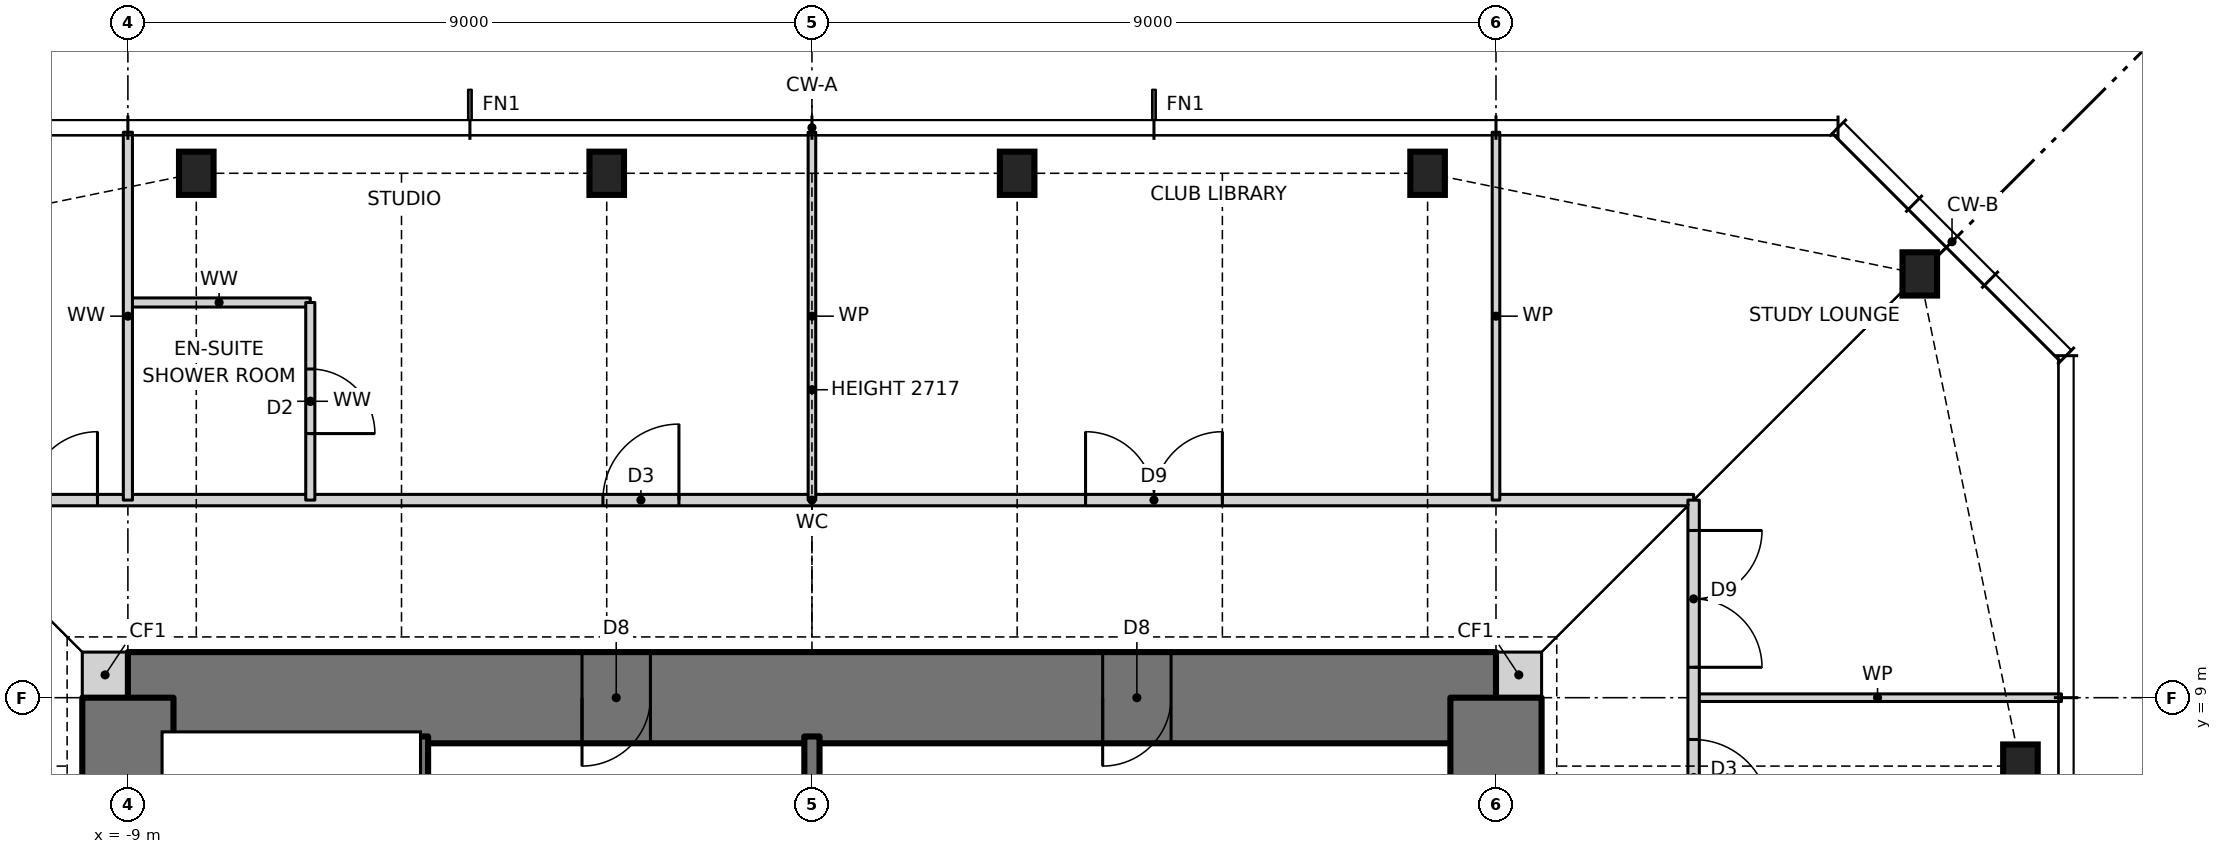
"""IFC4 building model, lengths in metres.
Left out: names, types, materials, properties, quantities, classifications, styles, units other than length and angle.
Written with IfcOpenShell. Run it as: python <this file> out.ifc"""

import sys

from ifc_helpers import new_model, si_unit, direction, frame, frame_2d, origin, origin_2d, place, context, subcontext, project, spatial, rectangle, i_section, extrude, element, fill, save


model = new_model("IFC4")
c1 = context("Model", 3, precision=1e-05, world=origin(), true_north=direction((0.0, 1.0)))
c2 = subcontext(c1, "Body", "Model", "MODEL_VIEW")
j1 = project(units=[si_unit("LENGTHUNIT", "METRE"), si_unit("PLANEANGLEUNIT", "RADIAN")], contexts=[c1])
p1 = place(None, origin())
s1 = spatial("IfcSite", under=j1, at=p1, CompositionType="ELEMENT")
p2 = place(p1, origin())
s2 = spatial("IfcBuilding", under=s1, at=p2, CompositionType="ELEMENT")
p3 = place(p2, frame((0.0, 0.0, 264.0)))
s3 = spatial("IfcBuildingStorey", under=s2, at=p3, CompositionType="ELEMENT", Elevation=264.0)
for number, where, z_axis, x_axis in (
    (1, (15.9, 8.1, 0.0), (0.0, 0.0, 1.0), (1.0, 0.0, 0.0)),
    (2, (14.576, 14.576, 0.0), (0.0, 0.0, 1.0), (1.0, 0.0, 0.0)),
    (3, (8.1, 15.9, 0.0), (0.0, 0.0, 1.0), (1.0, 0.0, 0.0)),
    (4, (2.7, 15.9, 0.0), (0.0, 0.0, 1.0), (1.0, 0.0, 0.0)),
    (5, (-2.7, 15.9, 0.0), (0.0, 0.0, 1.0), (1.0, 0.0, 0.0)),
    (6, (-8.1, 15.9, 0.0), (0.0, 0.0, 1.0), (1.0, 0.0, 0.0)),
):
    element("IfcColumn", number, at=place(p3, frame(where, z_axis=z_axis, x_axis=x_axis)), inside=s3, PredefinedType="COLUMN", context=c2, shape_type="SweptSolid", body=[
        extrude(i_section(OverallWidth=0.455, OverallDepth=0.569, WebThickness=0.078, FlangeThickness=0.125, at=origin_2d()), origin(), (0.0, 0.0, 1.0), 3.5),
    ])
for number, where, z_axis, x_axis in (
    (7, (9.0, 9.3, 0.0), (0.0, 0.0, 1.0), (1.0, 0.0, 0.0)),
    (8, (-9.6, 9.3, 0.0), (0.0, 0.0, 1.0), (1.0, 0.0, 0.0)),
):
    element("IfcWall", number, at=place(p3, frame(where, z_axis=z_axis, x_axis=x_axis)), inside=s3, PredefinedType="SOLIDWALL", context=c2, shape_type="SweptSolid", body=[
        extrude(rectangle(XDim=0.6, YDim=0.6, at=frame_2d((0.3, 0.0))), origin(), (0.0, 0.0, 1.0), 3.5),
    ])
p4 = place(p3, frame((9.0, 9.0, 0.0), z_axis=(0.0, 0.0, 1.0), x_axis=(-1.0, 0.0, 0.0)))
e9 = element("IfcWall", 9, at=p4, inside=s3, PredefinedType="SHEAR", context=c2, shape_type="SweptSolid", body=[
    extrude(rectangle(XDim=18.0, YDim=1.2, at=frame_2d((9.0, 0.0))), origin(), (0.0, 0.0, 1.0), 3.5),
])
p5 = place(p4, frame((11.125, 0.0, 0.0)))
e10 = element("IfcOpeningElement", 10, at=p5, cuts=e9, PredefinedType="OPENING", context=c2, shape_type="SweptSolid", body=[
    extrude(rectangle(XDim=0.9, YDim=2.1, at=frame_2d((0.45, 1.05))), frame((0.0, 0.61, 0.0), z_axis=(0.0, -1.0, 0.0), x_axis=(1.0, 0.0, 0.0)), (0.0, 0.0, 1.0), 1.22),
])
p6 = place(p4, frame((4.275, 0.0, 0.0)))
e11 = element("IfcOpeningElement", 11, at=p6, cuts=e9, PredefinedType="OPENING", context=c2, shape_type="SweptSolid", body=[
    extrude(rectangle(XDim=0.9, YDim=2.1, at=frame_2d((0.45, 1.05))), frame((0.0, 0.61, 0.0), z_axis=(0.0, -1.0, 0.0), x_axis=(1.0, 0.0, 0.0)), (0.0, 0.0, 1.0), 1.22),
])
p7 = place(p3, frame((9.0, -9.0, 0.0), z_axis=(0.0, 0.0, 1.0), x_axis=(0.0, 1.0, 0.0)))
e12 = element("IfcWall", 12, at=p7, inside=s3, PredefinedType="SHEAR", context=c2, shape_type="SweptSolid", body=[
    extrude(rectangle(XDim=18.0, YDim=1.2, at=frame_2d((9.0, 0.0))), origin(), (0.0, 0.0, 1.0), 3.5),
])
p8 = place(p7, frame((8.5, 0.0, 0.0)))
e13 = element("IfcOpeningElement", 13, at=p8, cuts=e12, PredefinedType="OPENING", context=c2, shape_type="SweptSolid", body=[
    extrude(rectangle(XDim=1.0, YDim=2.1, at=frame_2d((0.5, 1.05))), frame((0.0, 0.61, 0.0), z_axis=(0.0, -1.0, 0.0), x_axis=(1.0, 0.0, 0.0)), (0.0, 0.0, 1.0), 1.22),
])
p9 = place(p3, frame((-9.0, 9.0, 0.0), z_axis=(0.0, 0.0, 1.0), x_axis=(0.0, -1.0, 0.0)))
e14 = element("IfcWall", 14, at=p9, inside=s3, PredefinedType="SHEAR", context=c2, shape_type="SweptSolid", body=[
    extrude(rectangle(XDim=18.0, YDim=1.2, at=frame_2d((9.0, 0.0))), origin(), (0.0, 0.0, 1.0), 3.5),
])
p10 = place(p9, frame((8.5, 0.0, 0.0)))
e15 = element("IfcOpeningElement", 15, at=p10, cuts=e14, PredefinedType="OPENING", context=c2, shape_type="SweptSolid", body=[
    extrude(rectangle(XDim=1.0, YDim=2.1, at=frame_2d((0.5, 1.05))), frame((0.0, 0.61, 0.0), z_axis=(0.0, -1.0, 0.0), x_axis=(1.0, 0.0, 0.0)), (0.0, 0.0, 1.0), 1.22),
])
p11 = place(p3, frame((11.6, 9.0, 0.0), z_axis=(0.0, 0.0, 1.0), x_axis=(1.0, 0.0, 0.0)))
e16 = element("IfcWall", 16, at=p11, inside=s3, PredefinedType="PARTITIONING", context=c2, shape_type="SweptSolid", body=[
    extrude(rectangle(XDim=4.84, YDim=0.1, at=frame_2d((2.42, 0.0))), origin(), (0.0, 0.0, 1.0), 3.25),
])
p12 = place(p3, frame((-11.6, 11.6, 0.0), z_axis=(0.0, 0.0, 1.0), x_axis=(1.0, 0.0, 0.0)))
e17 = element("IfcWall", 17, at=p12, inside=s3, PredefinedType="PARTITIONING", context=c2, shape_type="SweptSolid", body=[
    extrude(rectangle(XDim=23.2, YDim=0.15, at=frame_2d((11.6, 0.0))), origin(), (0.0, 0.0, 1.0), 3.25),
])
p13 = place(p12, frame((15.2, 0.0, 0.0)))
e18 = element("IfcOpeningElement", 18, at=p13, cuts=e17, PredefinedType="OPENING", context=c2, shape_type="SweptSolid", body=[
    extrude(rectangle(XDim=1.8, YDim=2.1, at=frame_2d((0.9, 1.05))), frame((0.0, 0.085, 0.0), z_axis=(0.0, -1.0, 0.0), x_axis=(1.0, 0.0, 0.0)), (0.0, 0.0, 1.0), 0.17),
])
p14 = place(p12, frame((8.85, 0.0, 0.0)))
e19 = element("IfcOpeningElement", 19, at=p14, cuts=e17, PredefinedType="OPENING", context=c2, shape_type="SweptSolid", body=[
    extrude(rectangle(XDim=1.0, YDim=2.1, at=frame_2d((0.5, 1.05))), frame((0.0, 0.085, 0.0), z_axis=(0.0, -1.0, 0.0), x_axis=(1.0, 0.0, 0.0)), (0.0, 0.0, 1.0), 0.17),
])
p15 = place(p12, frame((0.4, 0.0, 0.0)))
e20 = element("IfcOpeningElement", 20, at=p15, cuts=e17, PredefinedType="OPENING", context=c2, shape_type="SweptSolid", body=[
    extrude(rectangle(XDim=1.8, YDim=2.1, at=frame_2d((0.9, 1.05))), frame((0.0, 0.085, 0.0), z_axis=(0.0, -1.0, 0.0), x_axis=(1.0, 0.0, 0.0)), (0.0, 0.0, 1.0), 0.17),
])
p16 = place(p3, frame((-9.0, 14.2, 0.0), z_axis=(0.0, 0.0, 1.0), x_axis=(1.0, 0.0, 0.0)))
e21 = element("IfcWall", 21, at=p16, inside=s3, PredefinedType="PARTITIONING", context=c2, shape_type="SweptSolid", body=[
    extrude(rectangle(XDim=2.4, YDim=0.12, at=frame_2d((1.2, 0.0))), origin(), (0.0, 0.0, 1.0), 3.25),
])
p17 = place(p3, frame((11.6, -12.1, 0.0), z_axis=(0.0, 0.0, 1.0), x_axis=(0.0, 1.0, 0.0)))
e22 = element("IfcWall", 22, at=p17, inside=s3, PredefinedType="PARTITIONING", context=c2, shape_type="SweptSolid", body=[
    extrude(rectangle(XDim=23.7, YDim=0.15, at=frame_2d((11.85, 0.0))), origin(), (0.0, 0.0, 1.0), 3.25),
])
p18 = place(p17, frame((6.2, 0.0, 0.0)))
e23 = element("IfcOpeningElement", 23, at=p18, cuts=e22, PredefinedType="OPENING", context=c2, shape_type="SweptSolid", body=[
    extrude(rectangle(XDim=1.0, YDim=2.1, at=frame_2d((0.5, 1.05))), frame((0.0, 0.085, 0.0), z_axis=(0.0, -1.0, 0.0), x_axis=(1.0, 0.0, 0.0)), (0.0, 0.0, 1.0), 0.17),
])
p19 = place(p17, frame((12.65, 0.0, 0.0)))
e24 = element("IfcOpeningElement", 24, at=p19, cuts=e22, PredefinedType="OPENING", context=c2, shape_type="SweptSolid", body=[
    extrude(rectangle(XDim=1.0, YDim=2.1, at=frame_2d((0.5, 1.05))), frame((0.0, 0.085, 0.0), z_axis=(0.0, -1.0, 0.0), x_axis=(1.0, 0.0, 0.0)), (0.0, 0.0, 1.0), 0.17),
])
p20 = place(p17, frame((19.55, 0.0, 0.0)))
e25 = element("IfcOpeningElement", 25, at=p20, cuts=e22, PredefinedType="OPENING", context=c2, shape_type="SweptSolid", body=[
    extrude(rectangle(XDim=1.0, YDim=2.1, at=frame_2d((0.5, 1.05))), frame((0.0, 0.085, 0.0), z_axis=(0.0, -1.0, 0.0), x_axis=(1.0, 0.0, 0.0)), (0.0, 0.0, 1.0), 0.17),
])
p21 = place(p17, frame((21.5, 0.0, 0.0)))
e26 = element("IfcOpeningElement", 26, at=p21, cuts=e22, PredefinedType="OPENING", context=c2, shape_type="SweptSolid", body=[
    extrude(rectangle(XDim=1.8, YDim=2.1, at=frame_2d((0.9, 1.05))), frame((0.0, 0.085, 0.0), z_axis=(0.0, -1.0, 0.0), x_axis=(1.0, 0.0, 0.0)), (0.0, 0.0, 1.0), 0.17),
])
p22 = place(p17, frame((1.125, 0.0, 0.0)))
e27 = element("IfcOpeningElement", 27, at=p22, cuts=e22, PredefinedType="OPENING", context=c2, shape_type="SweptSolid", body=[
    extrude(rectangle(XDim=0.85, YDim=2.1, at=frame_2d((0.425, 1.05))), frame((0.0, 0.085, 0.0), z_axis=(0.0, -1.0, 0.0), x_axis=(1.0, 0.0, 0.0)), (0.0, 0.0, 1.0), 0.17),
])
p23 = place(p3, frame((9.0, 11.6, 0.0), z_axis=(0.0, 0.0, 1.0), x_axis=(0.0, 1.0, 0.0)))
e28 = element("IfcWall", 28, at=p23, inside=s3, PredefinedType="PARTITIONING", context=c2, shape_type="SweptSolid", body=[
    extrude(rectangle(XDim=4.84, YDim=0.1, at=frame_2d((2.42, 0.0))), origin(), (0.0, 0.0, 1.0), 3.25),
])
p24 = place(p3, frame((0.0, 4.4, 0.0), z_axis=(0.0, 0.0, 1.0), x_axis=(0.0, 1.0, 0.0)))
e29 = element("IfcWall", 29, at=p24, inside=s3, PredefinedType="SOLIDWALL", context=c2, shape_type="SweptSolid", body=[
    extrude(rectangle(XDim=4.09, YDim=0.2, at=frame_2d((2.045, 0.0))), origin(), (0.0, 0.0, 1.0), 3.5),
])
p25 = place(p3, frame((0.0, 11.6, 0.0), z_axis=(0.0, 0.0, 1.0), x_axis=(0.0, 1.0, 0.0)))
e30 = element("IfcWall", 30, at=p25, inside=s3, PredefinedType="PARTITIONING", context=c2, shape_type="SweptSolid", body=[
    extrude(rectangle(XDim=4.84, YDim=0.1, at=frame_2d((2.42, 0.0))), origin(), (0.0, 0.0, 1.0), 2.717),
])
p26 = place(p3, frame((-5.15, 1.6, 0.0), z_axis=(0.0, 0.0, 1.0), x_axis=(0.0, 1.0, 0.0)))
e31 = element("IfcWall", 31, at=p26, inside=s3, PredefinedType="SOLIDWALL", context=c2, shape_type="SweptSolid", body=[
    extrude(rectangle(XDim=6.89, YDim=0.2, at=frame_2d((3.445, 0.0))), origin(), (0.0, 0.0, 1.0), 3.5),
])
p27 = place(p3, frame((-6.6, 11.6, 0.0), z_axis=(0.0, 0.0, 1.0), x_axis=(0.0, 1.0, 0.0)))
e32 = element("IfcWall", 32, at=p27, inside=s3, PredefinedType="PARTITIONING", context=c2, shape_type="SweptSolid", body=[
    extrude(rectangle(XDim=2.6, YDim=0.12, at=frame_2d((1.3, 0.0))), origin(), (0.0, 0.0, 1.0), 3.25),
])
p28 = place(p27, frame((0.875, 0.0, 0.0)))
e33 = element("IfcOpeningElement", 33, at=p28, cuts=e32, PredefinedType="OPENING", context=c2, shape_type="SweptSolid", body=[
    extrude(rectangle(XDim=0.85, YDim=2.1, at=frame_2d((0.425, 1.05))), frame((0.0, 0.07, 0.0), z_axis=(0.0, -1.0, 0.0), x_axis=(1.0, 0.0, 0.0)), (0.0, 0.0, 1.0), 0.14),
])
p29 = place(p3, frame((-9.0, 11.6, 0.0), z_axis=(0.0, 0.0, 1.0), x_axis=(0.0, 1.0, 0.0)))
e34 = element("IfcWall", 34, at=p29, inside=s3, PredefinedType="PARTITIONING", context=c2, shape_type="SweptSolid", body=[
    extrude(rectangle(XDim=4.84, YDim=0.12, at=frame_2d((2.42, 0.0))), origin(), (0.0, 0.0, 1.0), 3.25),
])
p30 = place(p20, frame((1.0, 0.0, 0.0), z_axis=(0.0, 0.0, 1.0), x_axis=(-1.0, 0.0, 0.0)))
e35 = element("IfcDoor", 35, at=p30, inside=s3, OperationType="SINGLE_SWING_RIGHT", PredefinedType="DOOR", context=c2, shape_type="SweptSolid", body=[
    extrude(rectangle(XDim=1.0, YDim=2.1, at=frame_2d((0.5, 1.05))), frame((0.0, 0.025, 0.0), z_axis=(0.0, -1.0, 0.0), x_axis=(1.0, 0.0, 0.0)), (0.0, 0.0, 1.0), 0.05),
])
fill(e25, e35)
p31 = place(p13, origin())
e36 = element("IfcDoor", 36, at=p31, inside=s3, OperationType="DOUBLE_DOOR_SINGLE_SWING", PredefinedType="DOOR", context=c2, shape_type="SweptSolid", body=[
    extrude(rectangle(XDim=1.8, YDim=2.1, at=frame_2d((0.9, 1.05))), frame((0.0, 0.025, 0.0), z_axis=(0.0, -1.0, 0.0), x_axis=(1.0, 0.0, 0.0)), (0.0, 0.0, 1.0), 0.05),
])
fill(e18, e36)
p32 = place(p14, origin())
e37 = element("IfcDoor", 37, at=p32, inside=s3, OperationType="SINGLE_SWING_RIGHT", PredefinedType="DOOR", context=c2, shape_type="SweptSolid", body=[
    extrude(rectangle(XDim=1.0, YDim=2.1, at=frame_2d((0.5, 1.05))), frame((0.0, 0.025, 0.0), z_axis=(0.0, -1.0, 0.0), x_axis=(1.0, 0.0, 0.0)), (0.0, 0.0, 1.0), 0.05),
])
fill(e19, e37)
p33 = place(p28, frame((0.85, 0.0, 0.0), z_axis=(0.0, 0.0, 1.0), x_axis=(-1.0, 0.0, 0.0)))
e38 = element("IfcDoor", 38, at=p33, inside=s3, OperationType="SINGLE_SWING_RIGHT", PredefinedType="DOOR", context=c2, shape_type="SweptSolid", body=[
    extrude(rectangle(XDim=0.85, YDim=2.1, at=frame_2d((0.425, 1.05))), frame((0.0, 0.025, 0.0), z_axis=(0.0, -1.0, 0.0), x_axis=(1.0, 0.0, 0.0)), (0.0, 0.0, 1.0), 0.05),
])
fill(e33, e38)
p34 = place(p21, frame((1.8, 0.0, 0.0), z_axis=(0.0, 0.0, 1.0), x_axis=(-1.0, 0.0, 0.0)))
e39 = element("IfcDoor", 39, at=p34, inside=s3, OperationType="DOUBLE_DOOR_SINGLE_SWING", PredefinedType="DOOR", context=c2, shape_type="SweptSolid", body=[
    extrude(rectangle(XDim=1.8, YDim=2.1, at=frame_2d((0.9, 1.05))), frame((0.0, 0.025, 0.0), z_axis=(0.0, -1.0, 0.0), x_axis=(1.0, 0.0, 0.0)), (0.0, 0.0, 1.0), 0.05),
])
fill(e26, e39)
p35 = place(p15, origin())
e40 = element("IfcDoor", 40, at=p35, inside=s3, OperationType="DOUBLE_DOOR_SINGLE_SWING", PredefinedType="DOOR", context=c2, shape_type="SweptSolid", body=[
    extrude(rectangle(XDim=1.8, YDim=2.1, at=frame_2d((0.9, 1.05))), frame((0.0, 0.025, 0.0), z_axis=(0.0, -1.0, 0.0), x_axis=(1.0, 0.0, 0.0)), (0.0, 0.0, 1.0), 0.05),
])
fill(e20, e40)
p36 = place(p5, origin())
e41 = element("IfcDoor", 41, at=p36, inside=s3, OperationType="SINGLE_SWING_RIGHT", PredefinedType="DOOR", context=c2, shape_type="SweptSolid", body=[
    extrude(rectangle(XDim=0.9, YDim=2.1, at=frame_2d((0.45, 1.05))), frame((0.0, 0.025, 0.0), z_axis=(0.0, -1.0, 0.0), x_axis=(1.0, 0.0, 0.0)), (0.0, 0.0, 1.0), 0.05),
])
fill(e10, e41)
p37 = place(p6, origin())
e42 = element("IfcDoor", 42, at=p37, inside=s3, OperationType="SINGLE_SWING_RIGHT", PredefinedType="DOOR", context=c2, shape_type="SweptSolid", body=[
    extrude(rectangle(XDim=0.9, YDim=2.1, at=frame_2d((0.45, 1.05))), frame((0.0, 0.025, 0.0), z_axis=(0.0, -1.0, 0.0), x_axis=(1.0, 0.0, 0.0)), (0.0, 0.0, 1.0), 0.05),
])
fill(e11, e42)
save(model, sys.argv[1])
